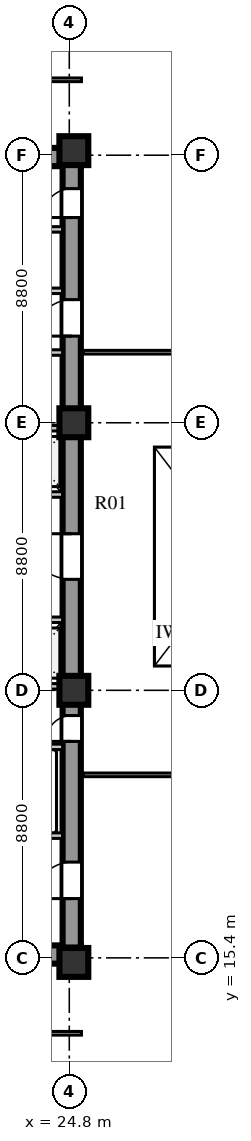
"""IFC4 building model, lengths in metres.
Left out: names, types, materials, properties, quantities, classifications, styles, units other than length and angle.
Written with IfcOpenShell. Run it as: python <this file> out.ifc"""

import sys

from ifc_helpers import new_model, si_unit, direction, frame, frame_2d, origin, origin_2d, place, context, subcontext, project, spatial, rectangle, extrude, element, fill, save


model = new_model("IFC4")
c1 = context("Model", 3, precision=1e-05, world=origin(), true_north=direction((0.0, 1.0)))
c2 = subcontext(c1, "Body", "Model", "MODEL_VIEW")
j1 = project(units=[si_unit("LENGTHUNIT", "METRE"), si_unit("PLANEANGLEUNIT", "RADIAN")], contexts=[c1])
p1 = place(None, origin())
s1 = spatial("IfcSite", under=j1, at=p1, CompositionType="ELEMENT")
p2 = place(p1, origin())
s2 = spatial("IfcBuilding", under=s1, at=p2, CompositionType="ELEMENT")
p3 = place(p2, frame((0.0, 0.0, 34.0)))
s3 = spatial("IfcBuildingStorey", under=s2, at=p3, CompositionType="ELEMENT", Elevation=34.0)
for number, where, z_axis, x_axis in (
    (1, (15.3, 15.51, 0.0), (0.0, 0.0, 1.0), (1.0, 0.0, 0.0)),
    (2, (15.3, 41.74, 0.0), (0.0, 0.0, 1.0), (1.0, 0.0, 0.0)),
):
    element("IfcWall", number, at=place(p3, frame(where, z_axis=z_axis, x_axis=x_axis)), inside=s3, PredefinedType="SHEAR", context=c2, shape_type="SweptSolid", body=[
        extrude(rectangle(XDim=9.88, YDim=0.6, at=frame_2d((4.94, 0.0))), origin(), (0.0, 0.0, 1.0), 3.72),
    ])
p4 = place(p3, frame((24.88, 15.74, 0.0), z_axis=(0.0, 0.0, 1.0), x_axis=(0.0, 1.0, 0.0)))
e3 = element("IfcWall", 3, at=p4, inside=s3, PredefinedType="SHEAR", context=c2, shape_type="SweptSolid", body=[
    extrude(rectangle(XDim=25.76, YDim=0.6, at=frame_2d((12.88, 0.0))), origin(), (0.0, 0.0, 1.0), 3.72),
])
p5 = place(p4, frame((1.61, 0.0, 0.0)))
e4 = element("IfcOpeningElement", 4, at=p5, cuts=e3, PredefinedType="OPENING", context=c2, shape_type="SweptSolid", body=[
    extrude(rectangle(XDim=1.2, YDim=2.1, at=frame_2d((0.6, 1.05))), frame((0.0, 0.31, 0.0), z_axis=(0.0, -1.0, 0.0), x_axis=(1.0, 0.0, 0.0)), (0.0, 0.0, 1.0), 0.62),
])
p6 = place(p4, frame((6.78, 0.0, 0.0)))
e5 = element("IfcOpeningElement", 5, at=p6, cuts=e3, PredefinedType="OPENING", context=c2, shape_type="SweptSolid", body=[
    extrude(rectangle(XDim=0.85, YDim=2.06, at=frame_2d((0.425, 1.03))), frame((0.0, 0.31, 0.0), z_axis=(0.0, -1.0, 0.0), x_axis=(1.0, 0.0, 0.0)), (0.0, 0.0, 1.0), 0.62),
])
p7 = place(p4, frame((12.11, 0.0, 0.0)))
e6 = element("IfcOpeningElement", 6, at=p7, cuts=e3, PredefinedType="OPENING", context=c2, shape_type="SweptSolid", body=[
    extrude(rectangle(XDim=1.5, YDim=2.12, at=frame_2d((0.75, 1.06))), frame((0.0, 0.31, 0.0), z_axis=(0.0, -1.0, 0.0), x_axis=(1.0, 0.0, 0.0)), (0.0, 0.0, 1.0), 0.62),
])
p8 = place(p4, frame((20.11, 0.0, 0.0)))
e7 = element("IfcOpeningElement", 7, at=p8, cuts=e3, PredefinedType="OPENING", context=c2, shape_type="SweptSolid", body=[
    extrude(rectangle(XDim=1.2, YDim=2.12, at=frame_2d((0.6, 1.06))), frame((0.0, 0.31, 0.0), z_axis=(0.0, -1.0, 0.0), x_axis=(1.0, 0.0, 0.0)), (0.0, 0.0, 1.0), 0.62),
])
p9 = place(p4, frame((24.01, 0.0, 0.0)))
e8 = element("IfcOpeningElement", 8, at=p9, cuts=e3, PredefinedType="OPENING", context=c2, shape_type="SweptSolid", body=[
    extrude(rectangle(XDim=0.95, YDim=2.1, at=frame_2d((0.475, 1.05))), frame((0.0, 0.31, 0.0), z_axis=(0.0, -1.0, 0.0), x_axis=(1.0, 0.0, 0.0)), (0.0, 0.0, 1.0), 0.62),
])
for number, where, z_axis, x_axis in (
    (9, (24.95, 15.25, 0.0), (0.0, 0.0, 1.0), (1.0, 0.0, 0.0)),
    (10, (24.95, 24.2, 0.0), (0.0, 0.0, 1.0), (1.0, 0.0, 0.0)),
    (11, (24.95, 33.0, 0.0), (0.0, 0.0, 1.0), (1.0, 0.0, 0.0)),
    (12, (24.95, 41.95, 0.0), (0.0, 0.0, 1.0), (1.0, 0.0, 0.0)),
):
    element("IfcColumn", number, at=place(p3, frame(where, z_axis=z_axis, x_axis=x_axis)), inside=s3, PredefinedType="COLUMN", context=c2, shape_type="SweptSolid", body=[
        extrude(rectangle(XDim=0.95, YDim=0.95, at=origin_2d()), origin(), (0.0, 0.0, 1.0), 3.72),
    ])
p10 = place(p3, frame((19.64, 19.42, 0.0), z_axis=(0.0, 0.0, 1.0), x_axis=(1.0, 0.0, 0.0)))
e13 = element("IfcWall", 13, at=p10, inside=s3, PredefinedType="SOLIDWALL", context=c2, shape_type="SweptSolid", body=[
    extrude(rectangle(XDim=4.94, YDim=0.18, at=frame_2d((2.47, 0.0))), origin(), (0.0, 0.0, 1.0), 3.72),
])
p11 = place(p10, frame((0.72, 0.0, 0.0)))
e14 = element("IfcOpeningElement", 14, at=p11, cuts=e13, PredefinedType="OPENING", context=c2, shape_type="SweptSolid", body=[
    extrude(rectangle(XDim=1.1, YDim=2.1, at=frame_2d((0.55, 1.05))), frame((0.0, 0.1, 0.0), z_axis=(0.0, -1.0, 0.0), x_axis=(1.0, 0.0, 0.0)), (0.0, 0.0, 1.0), 0.2),
])
p12 = place(p10, frame((3.02, 0.0, 0.0)))
e15 = element("IfcOpeningElement", 15, at=p12, cuts=e13, PredefinedType="OPENING", context=c2, shape_type="SweptSolid", body=[
    extrude(rectangle(XDim=1.1, YDim=2.1, at=frame_2d((0.55, 1.05))), frame((0.0, 0.1, 0.0), z_axis=(0.0, -1.0, 0.0), x_axis=(1.0, 0.0, 0.0)), (0.0, 0.0, 1.0), 0.2),
])
p13 = place(p3, frame((19.64, 22.34, 0.0), z_axis=(0.0, 0.0, 1.0), x_axis=(1.0, 0.0, 0.0)))
e16 = element("IfcWall", 16, at=p13, inside=s3, PredefinedType="SOLIDWALL", context=c2, shape_type="SweptSolid", body=[
    extrude(rectangle(XDim=4.94, YDim=0.18, at=frame_2d((2.47, 0.0))), origin(), (0.0, 0.0, 1.0), 3.72),
])
p14 = place(p3, frame((15.9, 26.52, 0.0), z_axis=(0.0, 0.0, 1.0), x_axis=(1.0, 0.0, 0.0)))
e17 = element("IfcWall", 17, at=p14, inside=s3, PredefinedType="SOLIDWALL", context=c2, shape_type="SweptSolid", body=[
    extrude(rectangle(XDim=8.68, YDim=0.18, at=frame_2d((4.34, 0.0))), origin(), (0.0, 0.0, 1.0), 3.72),
])
p15 = place(p14, frame((1.76, 0.0, 0.0)))
e18 = element("IfcOpeningElement", 18, at=p15, cuts=e17, PredefinedType="OPENING", context=c2, shape_type="SweptSolid", body=[
    extrude(rectangle(XDim=1.0, YDim=2.1, at=frame_2d((0.5, 1.05))), frame((0.0, 0.1, 0.0), z_axis=(0.0, -1.0, 0.0), x_axis=(1.0, 0.0, 0.0)), (0.0, 0.0, 1.0), 0.2),
])
p16 = place(p14, frame((3.6, 0.0, 0.0)))
e19 = element("IfcOpeningElement", 19, at=p16, cuts=e17, PredefinedType="OPENING", context=c2, shape_type="SweptSolid", body=[
    extrude(rectangle(XDim=1.0, YDim=2.1, at=frame_2d((0.5, 1.05))), frame((0.0, 0.1, 0.0), z_axis=(0.0, -1.0, 0.0), x_axis=(1.0, 0.0, 0.0)), (0.0, 0.0, 1.0), 0.2),
])
p17 = place(p14, frame((5.44, 0.0, 0.0)))
e20 = element("IfcOpeningElement", 20, at=p17, cuts=e17, PredefinedType="OPENING", context=c2, shape_type="SweptSolid", body=[
    extrude(rectangle(XDim=1.0, YDim=2.1, at=frame_2d((0.5, 1.05))), frame((0.0, 0.1, 0.0), z_axis=(0.0, -1.0, 0.0), x_axis=(1.0, 0.0, 0.0)), (0.0, 0.0, 1.0), 0.2),
])
p18 = place(p14, frame((7.28, 0.0, 0.0)))
e21 = element("IfcOpeningElement", 21, at=p18, cuts=e17, PredefinedType="OPENING", context=c2, shape_type="SweptSolid", body=[
    extrude(rectangle(XDim=1.0, YDim=2.1, at=frame_2d((0.5, 1.05))), frame((0.0, 0.1, 0.0), z_axis=(0.0, -1.0, 0.0), x_axis=(1.0, 0.0, 0.0)), (0.0, 0.0, 1.0), 0.2),
])
p19 = place(p3, frame((15.9, 24.33, 0.0), z_axis=(0.0, 0.0, 1.0), x_axis=(1.0, 0.0, 0.0)))
e22 = element("IfcWall", 22, at=p19, inside=s3, PredefinedType="SOLIDWALL", context=c2, shape_type="SweptSolid", body=[
    extrude(rectangle(XDim=8.68, YDim=0.18, at=frame_2d((4.34, 0.0))), origin(), (0.0, 0.0, 1.0), 3.02),
])
p20 = place(p3, frame((15.9, 30.64, 0.0), z_axis=(0.0, 0.0, 1.0), x_axis=(1.0, 0.0, 0.0)))
e23 = element("IfcWall", 23, at=p20, inside=s3, PredefinedType="SOLIDWALL", context=c2, shape_type="SweptSolid", body=[
    extrude(rectangle(XDim=8.68, YDim=0.18, at=frame_2d((4.34, 0.0))), origin(), (0.0, 0.0, 1.0), 3.72),
])
p21 = place(p20, frame((1.76, 0.0, 0.0)))
e24 = element("IfcOpeningElement", 24, at=p21, cuts=e23, PredefinedType="OPENING", context=c2, shape_type="SweptSolid", body=[
    extrude(rectangle(XDim=1.0, YDim=2.1, at=frame_2d((0.5, 1.05))), frame((0.0, 0.1, 0.0), z_axis=(0.0, -1.0, 0.0), x_axis=(1.0, 0.0, 0.0)), (0.0, 0.0, 1.0), 0.2),
])
p22 = place(p20, frame((3.6, 0.0, 0.0)))
e25 = element("IfcOpeningElement", 25, at=p22, cuts=e23, PredefinedType="OPENING", context=c2, shape_type="SweptSolid", body=[
    extrude(rectangle(XDim=1.0, YDim=2.1, at=frame_2d((0.5, 1.05))), frame((0.0, 0.1, 0.0), z_axis=(0.0, -1.0, 0.0), x_axis=(1.0, 0.0, 0.0)), (0.0, 0.0, 1.0), 0.2),
])
p23 = place(p20, frame((5.44, 0.0, 0.0)))
e26 = element("IfcOpeningElement", 26, at=p23, cuts=e23, PredefinedType="OPENING", context=c2, shape_type="SweptSolid", body=[
    extrude(rectangle(XDim=1.0, YDim=2.1, at=frame_2d((0.5, 1.05))), frame((0.0, 0.1, 0.0), z_axis=(0.0, -1.0, 0.0), x_axis=(1.0, 0.0, 0.0)), (0.0, 0.0, 1.0), 0.2),
])
p24 = place(p20, frame((7.28, 0.0, 0.0)))
e27 = element("IfcOpeningElement", 27, at=p24, cuts=e23, PredefinedType="OPENING", context=c2, shape_type="SweptSolid", body=[
    extrude(rectangle(XDim=1.0, YDim=2.1, at=frame_2d((0.5, 1.05))), frame((0.0, 0.1, 0.0), z_axis=(0.0, -1.0, 0.0), x_axis=(1.0, 0.0, 0.0)), (0.0, 0.0, 1.0), 0.2),
])
p25 = place(p3, frame((15.9, 32.82, 0.0), z_axis=(0.0, 0.0, 1.0), x_axis=(1.0, 0.0, 0.0)))
e28 = element("IfcWall", 28, at=p25, inside=s3, PredefinedType="SOLIDWALL", context=c2, shape_type="SweptSolid", body=[
    extrude(rectangle(XDim=8.68, YDim=0.18, at=frame_2d((4.34, 0.0))), origin(), (0.0, 0.0, 1.0), 3.02),
])
p26 = place(p3, frame((22.02, 35.31, 0.0), z_axis=(0.0, 0.0, 1.0), x_axis=(1.0, 0.0, 0.0)))
e29 = element("IfcWall", 29, at=p26, inside=s3, PredefinedType="SOLIDWALL", context=c2, shape_type="SweptSolid", body=[
    extrude(rectangle(XDim=2.56, YDim=0.18, at=frame_2d((1.28, 0.0))), origin(), (0.0, 0.0, 1.0), 3.72),
])
p27 = place(p26, frame((0.55, 0.0, 0.0)))
e30 = element("IfcOpeningElement", 30, at=p27, cuts=e29, PredefinedType="OPENING", context=c2, shape_type="SweptSolid", body=[
    extrude(rectangle(XDim=1.0, YDim=2.1, at=frame_2d((0.5, 1.05))), frame((0.0, 0.1, 0.0), z_axis=(0.0, -1.0, 0.0), x_axis=(1.0, 0.0, 0.0)), (0.0, 0.0, 1.0), 0.2),
])
p28 = place(p3, frame((19.64, 37.34, 0.0), z_axis=(0.0, 0.0, 1.0), x_axis=(1.0, 0.0, 0.0)))
e31 = element("IfcWall", 31, at=p28, inside=s3, PredefinedType="SOLIDWALL", context=c2, shape_type="SweptSolid", body=[
    extrude(rectangle(XDim=4.94, YDim=0.18, at=frame_2d((2.47, 0.0))), origin(), (0.0, 0.0, 1.0), 3.72),
])
p29 = place(p28, frame((0.45, 0.0, 0.0)))
e32 = element("IfcOpeningElement", 32, at=p29, cuts=e31, PredefinedType="OPENING", context=c2, shape_type="SweptSolid", body=[
    extrude(rectangle(XDim=1.0, YDim=2.1, at=frame_2d((0.5, 1.05))), frame((0.0, 0.1, 0.0), z_axis=(0.0, -1.0, 0.0), x_axis=(1.0, 0.0, 0.0)), (0.0, 0.0, 1.0), 0.2),
])
p30 = place(p28, frame((2.5, 0.0, 0.0)))
e33 = element("IfcOpeningElement", 33, at=p30, cuts=e31, PredefinedType="OPENING", context=c2, shape_type="SweptSolid", body=[
    extrude(rectangle(XDim=1.0, YDim=2.1, at=frame_2d((0.5, 1.05))), frame((0.0, 0.1, 0.0), z_axis=(0.0, -1.0, 0.0), x_axis=(1.0, 0.0, 0.0)), (0.0, 0.0, 1.0), 0.2),
])
p31 = place(p3, frame((19.64, 39.36, 0.0), z_axis=(0.0, 0.0, 1.0), x_axis=(1.0, 0.0, 0.0)))
e34 = element("IfcWall", 34, at=p31, inside=s3, PredefinedType="SOLIDWALL", context=c2, shape_type="SweptSolid", body=[
    extrude(rectangle(XDim=4.94, YDim=0.18, at=frame_2d((2.47, 0.0))), origin(), (0.0, 0.0, 1.0), 3.72),
])
p32 = place(p3, frame((25.25, 21.42, 0.0), z_axis=(0.0, 0.0, 1.0), x_axis=(1.0, 0.0, 0.0)))
e35 = element("IfcWall", 35, at=p32, inside=s3, PredefinedType="PARTITIONING", context=c2, shape_type="SweptSolid", body=[
    extrude(rectangle(XDim=12.87, YDim=0.12, at=frame_2d((6.435, 0.0))), origin(), (0.0, 0.0, 1.0), 3.32),
])
p33 = place(p32, frame((5.945, 0.0, 0.0)))
e36 = element("IfcOpeningElement", 36, at=p33, cuts=e35, PredefinedType="OPENING", context=c2, shape_type="SweptSolid", body=[
    extrude(rectangle(XDim=0.95, YDim=2.08, at=frame_2d((0.475, 1.04))), frame((0.0, 0.07, 0.0), z_axis=(0.0, -1.0, 0.0), x_axis=(1.0, 0.0, 0.0)), (0.0, 0.0, 1.0), 0.14),
])
p34 = place(p3, frame((25.25, 35.32, 0.0), z_axis=(0.0, 0.0, 1.0), x_axis=(1.0, 0.0, 0.0)))
e37 = element("IfcWall", 37, at=p34, inside=s3, PredefinedType="PARTITIONING", context=c2, shape_type="SweptSolid", body=[
    extrude(rectangle(XDim=9.47, YDim=0.12, at=frame_2d((4.735, 0.0))), origin(), (0.0, 0.0, 1.0), 3.72),
])
p35 = place(p34, frame((4.265, 0.0, 0.0)))
e38 = element("IfcOpeningElement", 38, at=p35, cuts=e37, PredefinedType="OPENING", context=c2, shape_type="SweptSolid", body=[
    extrude(rectangle(XDim=0.95, YDim=2.08, at=frame_2d((0.475, 1.04))), frame((0.0, 0.07, 0.0), z_axis=(0.0, -1.0, 0.0), x_axis=(1.0, 0.0, 0.0)), (0.0, 0.0, 1.0), 0.14),
])
p36 = place(p3, frame((10.5, 12.92, 0.0), z_axis=(0.0, 0.0, 1.0), x_axis=(1.0, 0.0, 0.0)))
e39 = element("IfcWall", 39, at=p36, inside=s3, PredefinedType="PARTITIONING", context=c2, shape_type="SweptSolid", body=[
    extrude(rectangle(XDim=14.7, YDim=0.12, at=frame_2d((7.35, 0.0))), origin(), (0.0, 0.0, 1.0), 3.72),
])
p37 = place(p36, frame((6.2, 0.0, 0.0)))
e40 = element("IfcOpeningElement", 40, at=p37, cuts=e39, PredefinedType="OPENING", context=c2, shape_type="SweptSolid", body=[
    extrude(rectangle(XDim=1.0, YDim=2.08, at=frame_2d((0.5, 1.04))), frame((0.0, 0.07, 0.0), z_axis=(0.0, -1.0, 0.0), x_axis=(1.0, 0.0, 0.0)), (0.0, 0.0, 1.0), 0.14),
])
p38 = place(p3, frame((10.5, 44.28, 0.0), z_axis=(0.0, 0.0, 1.0), x_axis=(1.0, 0.0, 0.0)))
e41 = element("IfcWall", 41, at=p38, inside=s3, PredefinedType="PARTITIONING", context=c2, shape_type="SweptSolid", body=[
    extrude(rectangle(XDim=14.7, YDim=0.12, at=frame_2d((7.35, 0.0))), origin(), (0.0, 0.0, 1.0), 3.72),
])
p39 = place(p38, frame((6.2, 0.0, 0.0)))
e42 = element("IfcOpeningElement", 42, at=p39, cuts=e41, PredefinedType="OPENING", context=c2, shape_type="SweptSolid", body=[
    extrude(rectangle(XDim=1.0, YDim=2.08, at=frame_2d((0.5, 1.04))), frame((0.0, 0.07, 0.0), z_axis=(0.0, -1.0, 0.0), x_axis=(1.0, 0.0, 0.0)), (0.0, 0.0, 1.0), 0.14),
])
p40 = place(p5, frame((1.2, 0.0, 0.0), z_axis=(0.0, 0.0, 1.0), x_axis=(-1.0, 0.0, 0.0)))
e43 = element("IfcDoor", 43, at=p40, inside=s3, OperationType="SINGLE_SWING_RIGHT", PredefinedType="DOOR", context=c2, shape_type="SweptSolid", body=[
    extrude(rectangle(XDim=1.2, YDim=2.1, at=frame_2d((0.6, 1.05))), frame((0.0, 0.025, 0.0), z_axis=(0.0, -1.0, 0.0), x_axis=(1.0, 0.0, 0.0)), (0.0, 0.0, 1.0), 0.05),
])
fill(e4, e43)
p41 = place(p6, frame((0.85, 0.0, 0.0), z_axis=(0.0, 0.0, 1.0), x_axis=(-1.0, 0.0, 0.0)))
e44 = element("IfcDoor", 44, at=p41, inside=s3, OperationType="SINGLE_SWING_RIGHT", PredefinedType="DOOR", context=c2, shape_type="SweptSolid", body=[
    extrude(rectangle(XDim=0.85, YDim=2.06, at=frame_2d((0.425, 1.03))), frame((0.0, 0.025, 0.0), z_axis=(0.0, -1.0, 0.0), x_axis=(1.0, 0.0, 0.0)), (0.0, 0.0, 1.0), 0.05),
])
fill(e5, e44)
p42 = place(p7, frame((1.5, 0.0, 0.0), z_axis=(0.0, 0.0, 1.0), x_axis=(-1.0, 0.0, 0.0)))
e45 = element("IfcDoor", 45, at=p42, inside=s3, OperationType="SINGLE_SWING_LEFT", PredefinedType="DOOR", context=c2, shape_type="SweptSolid", body=[
    extrude(rectangle(XDim=1.5, YDim=2.12, at=frame_2d((0.75, 1.06))), frame((0.0, 0.025, 0.0), z_axis=(0.0, -1.0, 0.0), x_axis=(1.0, 0.0, 0.0)), (0.0, 0.0, 1.0), 0.05),
])
fill(e6, e45)
p43 = place(p8, frame((1.2, 0.0, 0.0), z_axis=(0.0, 0.0, 1.0), x_axis=(-1.0, 0.0, 0.0)))
e46 = element("IfcDoor", 46, at=p43, inside=s3, OperationType="SINGLE_SWING_RIGHT", PredefinedType="DOOR", context=c2, shape_type="SweptSolid", body=[
    extrude(rectangle(XDim=1.2, YDim=2.12, at=frame_2d((0.6, 1.06))), frame((0.0, 0.025, 0.0), z_axis=(0.0, -1.0, 0.0), x_axis=(1.0, 0.0, 0.0)), (0.0, 0.0, 1.0), 0.05),
])
fill(e7, e46)
p44 = place(p9, frame((0.95, 0.0, 0.0), z_axis=(0.0, 0.0, 1.0), x_axis=(-1.0, 0.0, 0.0)))
e47 = element("IfcDoor", 47, at=p44, inside=s3, OperationType="SINGLE_SWING_RIGHT", PredefinedType="DOOR", context=c2, shape_type="SweptSolid", body=[
    extrude(rectangle(XDim=0.95, YDim=2.1, at=frame_2d((0.475, 1.05))), frame((0.0, 0.025, 0.0), z_axis=(0.0, -1.0, 0.0), x_axis=(1.0, 0.0, 0.0)), (0.0, 0.0, 1.0), 0.05),
])
fill(e8, e47)
save(model, sys.argv[1])
